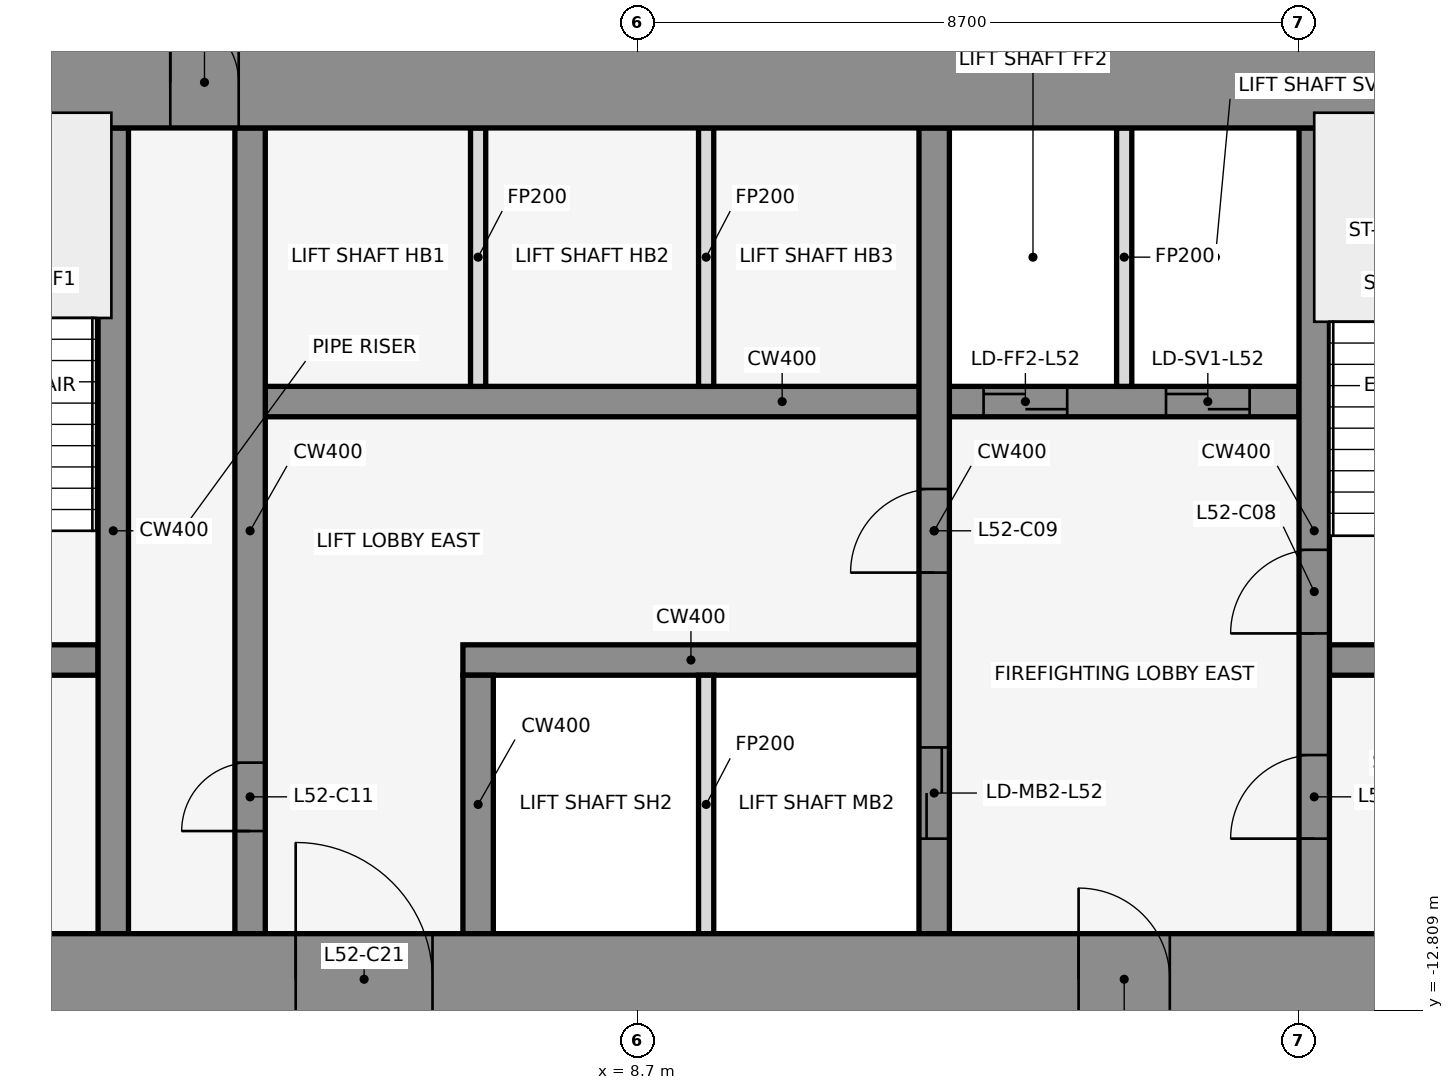
"""IFC4 building model, lengths in metres.
Left out: names, types, materials, properties, quantities, classifications, styles, units other than length and angle.
Written with IfcOpenShell. Run it as: python <this file> out.ifc"""

import sys

from ifc_helpers import new_model, si_unit, direction, frame, frame_2d, origin, place, context, subcontext, project, spatial, rectangle, extrude, element, fill, save


model = new_model("IFC4")
c1 = context("Model", 3, precision=1e-05, world=origin(), true_north=direction((0.0, 1.0)))
c2 = subcontext(c1, "Body", "Model", "MODEL_VIEW")
j1 = project(units=[si_unit("LENGTHUNIT", "METRE"), si_unit("PLANEANGLEUNIT", "RADIAN")], contexts=[c1])
p1 = place(None, origin())
s1 = spatial("IfcSite", under=j1, at=p1, CompositionType="ELEMENT")
p2 = place(p1, origin())
s2 = spatial("IfcBuilding", under=s1, at=p2, CompositionType="ELEMENT")
p3 = place(p2, frame((0.0, 0.0, 231.9)))
s3 = spatial("IfcBuildingStorey", under=s2, at=p3, CompositionType="ELEMENT", Elevation=231.9)
for number, where, z_axis, x_axis in (
    (1, (16.432, -0.105, 0.0), (0.0, 0.0, 1.0), (-0.84, 0.543, 0.0)),
    (2, (1.901, 1.08, 0.0), (0.0, 0.0, 1.0), (-0.84, -0.543, 0.0)),
):
    element("IfcWall", number, at=place(p3, frame(where, z_axis=z_axis, x_axis=x_axis)), inside=s3, PredefinedType="STANDARD", context=c2, shape_type="SweptSolid", body=[
        extrude(rectangle(XDim=2.183, YDim=0.25, at=frame_2d((1.091, 0.0))), origin(), (0.0, 0.0, 1.0), 3.9),
    ])
p4 = place(p3, frame((-1.6, -8.2, 0.0), z_axis=(0.0, 0.0, 1.0), x_axis=(1.0, 0.0, 0.0)))
e3 = element("IfcWall", 3, at=p4, inside=s3, PredefinedType="SHEAR", context=c2, shape_type="SweptSolid", body=[
    extrude(rectangle(XDim=3.2, YDim=0.4, at=frame_2d((1.6, 0.0))), origin(), (0.0, 0.0, 1.0), 4.1),
])
p5 = place(p4, frame((1.05, 0.0, 0.0)))
e4 = element("IfcOpeningElement", 4, at=p5, cuts=e3, PredefinedType="OPENING", context=c2, shape_type="SweptSolid", body=[
    extrude(rectangle(XDim=1.2, YDim=2.1, at=frame_2d((0.6, 1.05))), frame((0.0, 0.212, 0.0), z_axis=(0.0, -1.0, 0.0), x_axis=(1.0, 0.0, 0.0)), (0.0, 0.0, 1.0), 0.424),
])
p6 = place(p3, frame((6.4, -8.2, 0.0), z_axis=(0.0, 0.0, 1.0), x_axis=(1.0, 0.0, 0.0)))
e5 = element("IfcWall", 5, at=p6, inside=s3, PredefinedType="SHEAR", context=c2, shape_type="SweptSolid", body=[
    extrude(rectangle(XDim=6.0, YDim=0.4, at=frame_2d((3.0, 0.0))), origin(), (0.0, 0.0, 1.0), 4.1),
])
p7 = place(p3, frame((17.8, -8.2, 0.0), z_axis=(0.0, 0.0, 1.0), x_axis=(1.0, 0.0, 0.0)))
e6 = element("IfcWall", 6, at=p7, inside=s3, PredefinedType="SHEAR", context=c2, shape_type="SweptSolid", body=[
    extrude(rectangle(XDim=3.0, YDim=0.4, at=frame_2d((1.5, 0.0))), origin(), (0.0, 0.0, 1.0), 4.1),
])
p8 = place(p7, frame((0.85, 0.0, 0.0)))
e7 = element("IfcOpeningElement", 7, at=p8, cuts=e6, PredefinedType="OPENING", context=c2, shape_type="SweptSolid", body=[
    extrude(rectangle(XDim=1.2, YDim=2.1, at=frame_2d((0.6, 1.05))), frame((0.0, 0.212, 0.0), z_axis=(0.0, -1.0, 0.0), x_axis=(1.0, 0.0, 0.0)), (0.0, 0.0, 1.0), 0.424),
])
p9 = place(p3, frame((3.8, -4.8, 0.0), z_axis=(0.0, 0.0, 1.0), x_axis=(1.0, 0.0, 0.0)))
e8 = element("IfcWall", 8, at=p9, inside=s3, PredefinedType="SHEAR", context=c2, shape_type="SweptSolid", body=[
    extrude(rectangle(XDim=13.6, YDim=0.4, at=frame_2d((6.8, 0.0))), origin(), (0.0, 0.0, 1.0), 4.1),
])
p10 = place(p9, frame((9.45, 0.0, 0.0)))
e9 = element("IfcOpeningElement", 9, at=p10, cuts=e8, PredefinedType="OPENING", context=c2, shape_type="SweptSolid", body=[
    extrude(rectangle(XDim=1.1, YDim=2.1, at=frame_2d((0.55, 1.05))), frame((0.0, 0.212, 0.0), z_axis=(0.0, -1.0, 0.0), x_axis=(1.0, 0.0, 0.0)), (0.0, 0.0, 1.0), 0.424),
])
p11 = place(p9, frame((11.85, 0.0, 0.0)))
e10 = element("IfcOpeningElement", 10, at=p11, cuts=e8, PredefinedType="OPENING", context=c2, shape_type="SweptSolid", body=[
    extrude(rectangle(XDim=1.1, YDim=2.1, at=frame_2d((0.55, 1.05))), frame((0.0, 0.212, 0.0), z_axis=(0.0, -1.0, 0.0), x_axis=(1.0, 0.0, 0.0)), (0.0, 0.0, 1.0), 0.424),
])
p12 = place(p3, frame((1.8, -11.8, 0.0), z_axis=(0.0, 0.0, 1.0), x_axis=(0.0, 1.0, 0.0)))
e11 = element("IfcWall", 11, at=p12, inside=s3, PredefinedType="SHEAR", context=c2, shape_type="SweptSolid", body=[
    extrude(rectangle(XDim=10.6, YDim=0.4, at=frame_2d((5.3, 0.0))), origin(), (0.0, 0.0, 1.0), 4.1),
])
p13 = place(p3, frame((3.6, -11.8, 0.0), z_axis=(0.0, 0.0, 1.0), x_axis=(0.0, 1.0, 0.0)))
e12 = element("IfcWall", 12, at=p13, inside=s3, PredefinedType="SHEAR", context=c2, shape_type="SweptSolid", body=[
    extrude(rectangle(XDim=10.6, YDim=0.4, at=frame_2d((5.3, 0.0))), origin(), (0.0, 0.0, 1.0), 4.1),
])
p14 = place(p13, frame((1.35, 0.0, 0.0)))
e13 = element("IfcOpeningElement", 13, at=p14, cuts=e12, PredefinedType="OPENING", context=c2, shape_type="SweptSolid", body=[
    extrude(rectangle(XDim=0.9, YDim=2.1, at=frame_2d((0.45, 1.05))), frame((0.0, 0.212, 0.0), z_axis=(0.0, -1.0, 0.0), x_axis=(1.0, 0.0, 0.0)), (0.0, 0.0, 1.0), 0.424),
])
p15 = place(p3, frame((6.6, -11.8, 0.0), z_axis=(0.0, 0.0, 1.0), x_axis=(0.0, 1.0, 0.0)))
e14 = element("IfcWall", 14, at=p15, inside=s3, PredefinedType="SHEAR", context=c2, shape_type="SweptSolid", body=[
    extrude(rectangle(XDim=3.4, YDim=0.4, at=frame_2d((1.7, 0.0))), origin(), (0.0, 0.0, 1.0), 4.1),
])
for number, where, z_axis, x_axis in (
    (15, (6.6, -4.6, 0.0), (0.0, 0.0, 1.0), (0.0, 1.0, 0.0)),
    (16, (9.6, -11.8, 0.0), (0.0, 0.0, 1.0), (0.0, 1.0, 0.0)),
    (17, (9.6, -4.6, 0.0), (0.0, 0.0, 1.0), (0.0, 1.0, 0.0)),
):
    element("IfcWall", number, at=place(p3, frame(where, z_axis=z_axis, x_axis=x_axis)), inside=s3, PredefinedType="PARTITIONING", context=c2, shape_type="SweptSolid", body=[
        extrude(rectangle(XDim=3.4, YDim=0.2, at=frame_2d((1.7, 0.0))), origin(), (0.0, 0.0, 1.0), 2.79),
    ])
p16 = place(p3, frame((12.6, -11.8, 0.0), z_axis=(0.0, 0.0, 1.0), x_axis=(0.0, 1.0, 0.0)))
e18 = element("IfcWall", 18, at=p16, inside=s3, PredefinedType="SHEAR", context=c2, shape_type="SweptSolid", body=[
    extrude(rectangle(XDim=10.6, YDim=0.4, at=frame_2d((5.3, 0.0))), origin(), (0.0, 0.0, 1.0), 4.1),
])
p17 = place(p16, frame((1.25, 0.0, 0.0)))
e19 = element("IfcOpeningElement", 19, at=p17, cuts=e18, PredefinedType="OPENING", context=c2, shape_type="SweptSolid", body=[
    extrude(rectangle(XDim=1.2, YDim=2.1, at=frame_2d((0.6, 1.05))), frame((0.0, 0.212, 0.0), z_axis=(0.0, -1.0, 0.0), x_axis=(1.0, 0.0, 0.0)), (0.0, 0.0, 1.0), 0.424),
])
p18 = place(p16, frame((4.75, 0.0, 0.0)))
e20 = element("IfcOpeningElement", 20, at=p18, cuts=e18, PredefinedType="OPENING", context=c2, shape_type="SweptSolid", body=[
    extrude(rectangle(XDim=1.1, YDim=2.1, at=frame_2d((0.55, 1.05))), frame((0.0, 0.212, 0.0), z_axis=(0.0, -1.0, 0.0), x_axis=(1.0, 0.0, 0.0)), (0.0, 0.0, 1.0), 0.424),
])
p19 = place(p3, frame((15.1, -4.6, 0.0), z_axis=(0.0, 0.0, 1.0), x_axis=(0.0, 1.0, 0.0)))
e21 = element("IfcWall", 21, at=p19, inside=s3, PredefinedType="PARTITIONING", context=c2, shape_type="SweptSolid", body=[
    extrude(rectangle(XDim=3.4, YDim=0.2, at=frame_2d((1.7, 0.0))), origin(), (0.0, 0.0, 1.0), 2.79),
])
p20 = place(p3, frame((17.6, -11.8, 0.0), z_axis=(0.0, 0.0, 1.0), x_axis=(0.0, 1.0, 0.0)))
e22 = element("IfcWall", 22, at=p20, inside=s3, PredefinedType="SHEAR", context=c2, shape_type="SweptSolid", body=[
    extrude(rectangle(XDim=10.6, YDim=0.4, at=frame_2d((5.3, 0.0))), origin(), (0.0, 0.0, 1.0), 4.1),
])
p21 = place(p20, frame((1.25, 0.0, 0.0)))
e23 = element("IfcOpeningElement", 23, at=p21, cuts=e22, PredefinedType="OPENING", context=c2, shape_type="SweptSolid", body=[
    extrude(rectangle(XDim=1.1, YDim=2.1, at=frame_2d((0.55, 1.05))), frame((0.0, 0.212, 0.0), z_axis=(0.0, -1.0, 0.0), x_axis=(1.0, 0.0, 0.0)), (0.0, 0.0, 1.0), 0.424),
])
p22 = place(p20, frame((3.95, 0.0, 0.0)))
e24 = element("IfcOpeningElement", 24, at=p22, cuts=e22, PredefinedType="OPENING", context=c2, shape_type="SweptSolid", body=[
    extrude(rectangle(XDim=1.1, YDim=2.1, at=frame_2d((0.55, 1.05))), frame((0.0, 0.212, 0.0), z_axis=(0.0, -1.0, 0.0), x_axis=(1.0, 0.0, 0.0)), (0.0, 0.0, 1.0), 0.424),
])
p23 = place(p3, frame((-22.0, -0.6, 0.0), z_axis=(0.0, 0.0, 1.0), x_axis=(1.0, 0.0, 0.0)))
e25 = element("IfcWall", 25, at=p23, inside=s3, PredefinedType="SHEAR", context=c2, shape_type="SweptSolid", body=[
    extrude(rectangle(XDim=44.0, YDim=1.2, at=frame_2d((22.0, 0.0))), origin(), (0.0, 0.0, 1.0), 4.1),
])
p24 = place(p23, frame((18.55, 0.0, 0.0)))
e26 = element("IfcOpeningElement", 26, at=p24, cuts=e25, PredefinedType="OPENING", context=c2, shape_type="SweptSolid", body=[
    extrude(rectangle(XDim=0.9, YDim=2.1, at=frame_2d((0.45, 1.05))), frame((0.0, 0.612, 0.0), z_axis=(0.0, -1.0, 0.0), x_axis=(1.0, 0.0, 0.0)), (0.0, 0.0, 1.0), 1.224),
])
p25 = place(p23, frame((24.55, 0.0, 0.0)))
e27 = element("IfcOpeningElement", 27, at=p25, cuts=e25, PredefinedType="OPENING", context=c2, shape_type="SweptSolid", body=[
    extrude(rectangle(XDim=0.9, YDim=2.1, at=frame_2d((0.45, 1.05))), frame((0.0, 0.612, 0.0), z_axis=(0.0, -1.0, 0.0), x_axis=(1.0, 0.0, 0.0)), (0.0, 0.0, 1.0), 1.224),
])
p26 = place(p3, frame((-22.0, -12.4, 0.0), z_axis=(0.0, 0.0, 1.0), x_axis=(1.0, 0.0, 0.0)))
e28 = element("IfcWall", 28, at=p26, inside=s3, PredefinedType="SHEAR", context=c2, shape_type="SweptSolid", body=[
    extrude(rectangle(XDim=44.0, YDim=1.2, at=frame_2d((22.0, 0.0))), origin(), (0.0, 0.0, 1.0), 4.1),
])
p27 = place(p26, frame((2.2, 0.0, 0.0)))
e29 = element("IfcOpeningElement", 29, at=p27, cuts=e28, PredefinedType="OPENING", context=c2, shape_type="SweptSolid", body=[
    extrude(rectangle(XDim=1.2, YDim=2.1, at=frame_2d((0.6, 1.05))), frame((0.0, 0.612, 0.0), z_axis=(0.0, -1.0, 0.0), x_axis=(1.0, 0.0, 0.0)), (0.0, 0.0, 1.0), 1.224),
])
p28 = place(p26, frame((21.4, 0.0, 0.0)))
e30 = element("IfcOpeningElement", 30, at=p28, cuts=e28, PredefinedType="OPENING", context=c2, shape_type="SweptSolid", body=[
    extrude(rectangle(XDim=1.2, YDim=2.1, at=frame_2d((0.6, 1.05))), frame((0.0, 0.612, 0.0), z_axis=(0.0, -1.0, 0.0), x_axis=(1.0, 0.0, 0.0)), (0.0, 0.0, 1.0), 1.224),
])
p29 = place(p26, frame((40.6, 0.0, 0.0)))
e31 = element("IfcOpeningElement", 31, at=p29, cuts=e28, PredefinedType="OPENING", context=c2, shape_type="SweptSolid", body=[
    extrude(rectangle(XDim=1.2, YDim=2.1, at=frame_2d((0.6, 1.05))), frame((0.0, 0.612, 0.0), z_axis=(0.0, -1.0, 0.0), x_axis=(1.0, 0.0, 0.0)), (0.0, 0.0, 1.0), 1.224),
])
p30 = place(p26, frame((16.0, 0.0, 0.0)))
e32 = element("IfcOpeningElement", 32, at=p30, cuts=e28, PredefinedType="OPENING", context=c2, shape_type="SweptSolid", body=[
    extrude(rectangle(XDim=1.8, YDim=2.1, at=frame_2d((0.9, 1.05))), frame((0.0, 0.612, 0.0), z_axis=(0.0, -1.0, 0.0), x_axis=(1.0, 0.0, 0.0)), (0.0, 0.0, 1.0), 1.224),
])
p31 = place(p26, frame((6.3, 0.0, 0.0)))
e33 = element("IfcOpeningElement", 33, at=p31, cuts=e28, PredefinedType="OPENING", context=c2, shape_type="SweptSolid", body=[
    extrude(rectangle(XDim=1.2, YDim=2.1, at=frame_2d((0.6, 1.05))), frame((0.0, 0.612, 0.0), z_axis=(0.0, -1.0, 0.0), x_axis=(1.0, 0.0, 0.0)), (0.0, 0.0, 1.0), 1.224),
])
p32 = place(p26, frame((26.2, 0.0, 0.0)))
e34 = element("IfcOpeningElement", 34, at=p32, cuts=e28, PredefinedType="OPENING", context=c2, shape_type="SweptSolid", body=[
    extrude(rectangle(XDim=1.8, YDim=2.1, at=frame_2d((0.9, 1.05))), frame((0.0, 0.612, 0.0), z_axis=(0.0, -1.0, 0.0), x_axis=(1.0, 0.0, 0.0)), (0.0, 0.0, 1.0), 1.224),
])
p33 = place(p26, frame((36.5, 0.0, 0.0)))
e35 = element("IfcOpeningElement", 35, at=p33, cuts=e28, PredefinedType="OPENING", context=c2, shape_type="SweptSolid", body=[
    extrude(rectangle(XDim=1.2, YDim=2.1, at=frame_2d((0.6, 1.05))), frame((0.0, 0.612, 0.0), z_axis=(0.0, -1.0, 0.0), x_axis=(1.0, 0.0, 0.0)), (0.0, 0.0, 1.0), 1.224),
])
p34 = place(p21, origin())
e36 = element("IfcDoor", 36, at=p34, inside=s3, OperationType="SINGLE_SWING_LEFT", PredefinedType="DOOR", context=c2, shape_type="SweptSolid", body=[
    extrude(rectangle(XDim=1.1, YDim=2.1, at=frame_2d((0.55, 1.05))), frame((0.0, 0.025, 0.0), z_axis=(0.0, -1.0, 0.0), x_axis=(1.0, 0.0, 0.0)), (0.0, 0.0, 1.0), 0.05),
])
fill(e23, e36)
p35 = place(p17, origin())
e37 = element("IfcDoor", 37, at=p35, inside=s3, OperationType="DOUBLE_DOOR_SLIDING", PredefinedType="DOOR", context=c2, shape_type="SweptSolid", body=[
    extrude(rectangle(XDim=1.2, YDim=2.1, at=frame_2d((0.6, 1.05))), frame((0.0, 0.025, 0.0), z_axis=(0.0, -1.0, 0.0), x_axis=(1.0, 0.0, 0.0)), (0.0, 0.0, 1.0), 0.05),
])
fill(e19, e37)
p36 = place(p10, origin())
e38 = element("IfcDoor", 38, at=p36, inside=s3, OperationType="DOUBLE_DOOR_SLIDING", PredefinedType="DOOR", context=c2, shape_type="SweptSolid", body=[
    extrude(rectangle(XDim=1.1, YDim=2.1, at=frame_2d((0.55, 1.05))), frame((0.0, 0.025, 0.0), z_axis=(0.0, -1.0, 0.0), x_axis=(1.0, 0.0, 0.0)), (0.0, 0.0, 1.0), 0.05),
])
fill(e9, e38)
p37 = place(p11, origin())
e39 = element("IfcDoor", 39, at=p37, inside=s3, OperationType="DOUBLE_DOOR_SLIDING", PredefinedType="DOOR", context=c2, shape_type="SweptSolid", body=[
    extrude(rectangle(XDim=1.1, YDim=2.1, at=frame_2d((0.55, 1.05))), frame((0.0, 0.025, 0.0), z_axis=(0.0, -1.0, 0.0), x_axis=(1.0, 0.0, 0.0)), (0.0, 0.0, 1.0), 0.05),
])
fill(e10, e39)
p38 = place(p22, origin())
e40 = element("IfcDoor", 40, at=p38, inside=s3, OperationType="SINGLE_SWING_RIGHT", PredefinedType="DOOR", context=c2, shape_type="SweptSolid", body=[
    extrude(rectangle(XDim=1.1, YDim=2.1, at=frame_2d((0.55, 1.05))), frame((0.0, 0.025, 0.0), z_axis=(0.0, -1.0, 0.0), x_axis=(1.0, 0.0, 0.0)), (0.0, 0.0, 1.0), 0.05),
])
fill(e24, e40)
p39 = place(p18, frame((1.1, 0.0, 0.0), z_axis=(0.0, 0.0, 1.0), x_axis=(-1.0, 0.0, 0.0)))
e41 = element("IfcDoor", 41, at=p39, inside=s3, OperationType="SINGLE_SWING_RIGHT", PredefinedType="DOOR", context=c2, shape_type="SweptSolid", body=[
    extrude(rectangle(XDim=1.1, YDim=2.1, at=frame_2d((0.55, 1.05))), frame((0.0, 0.025, 0.0), z_axis=(0.0, -1.0, 0.0), x_axis=(1.0, 0.0, 0.0)), (0.0, 0.0, 1.0), 0.05),
])
fill(e20, e41)
p40 = place(p14, origin())
e42 = element("IfcDoor", 42, at=p40, inside=s3, OperationType="SINGLE_SWING_LEFT", PredefinedType="DOOR", context=c2, shape_type="SweptSolid", body=[
    extrude(rectangle(XDim=0.9, YDim=2.1, at=frame_2d((0.45, 1.05))), frame((0.0, 0.025, 0.0), z_axis=(0.0, -1.0, 0.0), x_axis=(1.0, 0.0, 0.0)), (0.0, 0.0, 1.0), 0.05),
])
fill(e13, e42)
p41 = place(p25, origin())
e43 = element("IfcDoor", 43, at=p41, inside=s3, OperationType="SINGLE_SWING_LEFT", PredefinedType="DOOR", context=c2, shape_type="SweptSolid", body=[
    extrude(rectangle(XDim=0.9, YDim=2.1, at=frame_2d((0.45, 1.05))), frame((0.0, 0.025, 0.0), z_axis=(0.0, -1.0, 0.0), x_axis=(1.0, 0.0, 0.0)), (0.0, 0.0, 1.0), 0.05),
])
fill(e27, e43)
p42 = place(p32, origin())
e44 = element("IfcDoor", 44, at=p42, inside=s3, OperationType="SINGLE_SWING_LEFT", PredefinedType="DOOR", context=c2, shape_type="SweptSolid", body=[
    extrude(rectangle(XDim=1.8, YDim=2.1, at=frame_2d((0.9, 1.05))), frame((0.0, 0.025, 0.0), z_axis=(0.0, -1.0, 0.0), x_axis=(1.0, 0.0, 0.0)), (0.0, 0.0, 1.0), 0.05),
])
fill(e34, e44)
p43 = place(p33, frame((1.2, 0.0, 0.0), z_axis=(0.0, 0.0, 1.0), x_axis=(-1.0, 0.0, 0.0)))
e45 = element("IfcDoor", 45, at=p43, inside=s3, OperationType="SINGLE_SWING_RIGHT", PredefinedType="DOOR", context=c2, shape_type="SweptSolid", body=[
    extrude(rectangle(XDim=1.2, YDim=2.1, at=frame_2d((0.6, 1.05))), frame((0.0, 0.025, 0.0), z_axis=(0.0, -1.0, 0.0), x_axis=(1.0, 0.0, 0.0)), (0.0, 0.0, 1.0), 0.05),
])
fill(e35, e45)
save(model, sys.argv[1])
